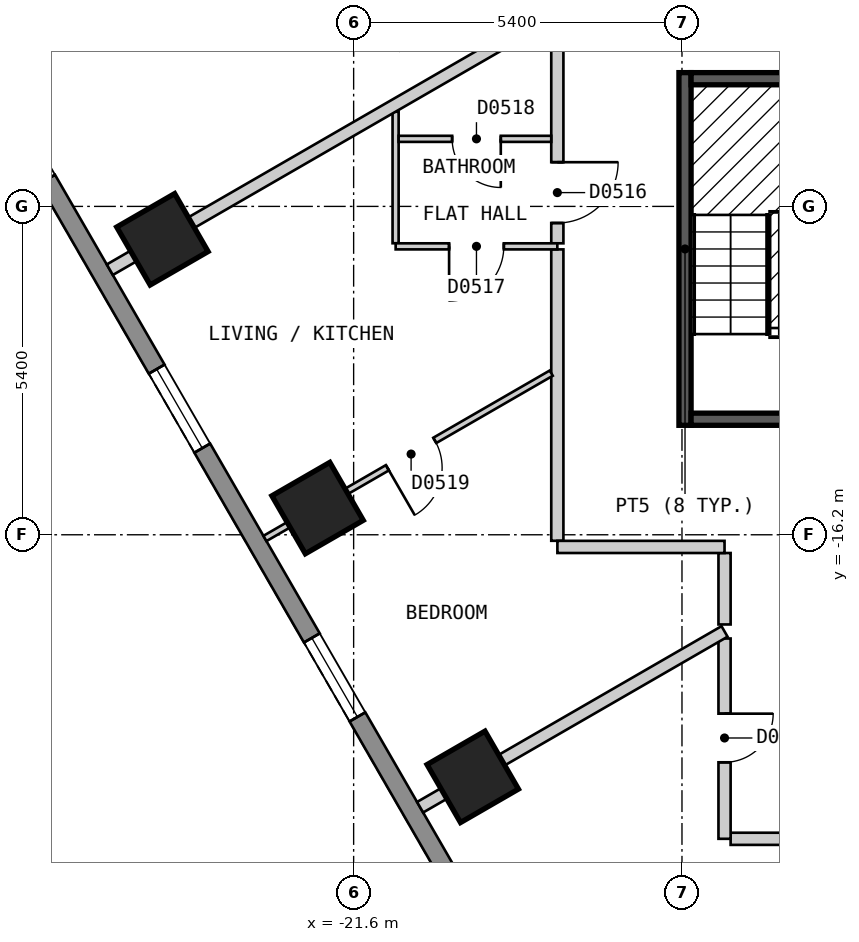
"""IFC4 building model, lengths in metres.
Left out: names, types, materials, properties, quantities, classifications, styles, units other than length and angle.
Written with IfcOpenShell. Run it as: python <this file> out.ifc"""

import sys

from ifc_helpers import new_model, si_unit, direction, frame, frame_2d, origin, origin_2d, place, context, subcontext, project, spatial, polyline, rectangle, outline, extrude, element, fill, save


model = new_model("IFC4")
c1 = context("Model", 3, precision=1e-05, world=origin(), true_north=direction((0.0, 1.0)))
c2 = subcontext(c1, "Body", "Model", "MODEL_VIEW")
j1 = project(units=[si_unit("LENGTHUNIT", "METRE"), si_unit("PLANEANGLEUNIT", "RADIAN")], contexts=[c1])
p1 = place(None, origin())
s1 = spatial("IfcSite", under=j1, at=p1, CompositionType="ELEMENT")
p2 = place(p1, origin())
s2 = spatial("IfcBuilding", under=s1, at=p2, CompositionType="ELEMENT")
p3 = place(p2, frame((0.0, 0.0, 44.4)))
s3 = spatial("IfcBuildingStorey", under=s2, at=p3, CompositionType="ELEMENT", Elevation=44.4)
for number, where, z_axis, x_axis in (
    (1, (-24.745, -11.341, 0.0), (0.0, 0.0, 1.0), (0.5, -0.866, 0.0)),
    (2, (-22.193, -15.761, 0.0), (0.0, 0.0, 1.0), (0.5, -0.866, 0.0)),
    (3, (-19.641, -20.181, 0.0), (0.0, 0.0, 1.0), (0.5, -0.866, 0.0)),
):
    element("IfcColumn", number, at=place(p3, frame(where, z_axis=z_axis, x_axis=x_axis)), inside=s3, PredefinedType="COLUMN", context=c2, shape_type="SweptSolid", body=[
        extrude(rectangle(XDim=1.1, YDim=1.1, at=origin_2d()), origin(), (0.0, 0.0, 1.0), 3.0),
    ])
p4 = place(p3, frame((-31.22, -2.425, 0.0), z_axis=(0.0, 0.0, 1.0), x_axis=(0.500001938803, -0.866024284413, 0.0)))
e4 = element("IfcWall", 4, at=p4, inside=s3, PredefinedType="SOLIDWALL", context=c2, shape_type="SweptSolid", body=[
    extrude(outline(polyline([(0.0, -0.15), (27.02, -0.15), (26.94, 0.15), (0.08, 0.15), (0.0, -0.15)])), origin(), (0.0, 0.0, 1.0), 2.7),
])
p5 = place(p4, frame((2.553, 0.0, 0.15)))
e5 = element("IfcOpeningElement", 5, at=p5, cuts=e4, PredefinedType="OPENING", context=c2, shape_type="SweptSolid", body=[
    extrude(rectangle(XDim=1.5, YDim=2.1, at=frame_2d((0.75, 1.05))), frame((0.0, 0.16, 0.0), z_axis=(0.0, -1.0, 0.0), x_axis=(1.0, 0.0, 0.0)), (0.0, 0.0, 1.0), 0.32),
])
p6 = place(p4, frame((7.657, 0.0, 0.15)))
e6 = element("IfcOpeningElement", 6, at=p6, cuts=e4, PredefinedType="OPENING", context=c2, shape_type="SweptSolid", body=[
    extrude(rectangle(XDim=1.5, YDim=2.1, at=frame_2d((0.75, 1.05))), frame((0.0, 0.16, 0.0), z_axis=(0.0, -1.0, 0.0), x_axis=(1.0, 0.0, 0.0)), (0.0, 0.0, 1.0), 0.32),
])
p7 = place(p4, frame((12.761, 0.0, 0.15)))
e7 = element("IfcOpeningElement", 7, at=p7, cuts=e4, PredefinedType="OPENING", context=c2, shape_type="SweptSolid", body=[
    extrude(rectangle(XDim=1.5, YDim=2.1, at=frame_2d((0.75, 1.05))), frame((0.0, 0.16, 0.0), z_axis=(0.0, -1.0, 0.0), x_axis=(1.0, 0.0, 0.0)), (0.0, 0.0, 1.0), 0.32),
])
p8 = place(p4, frame((17.865, 0.0, 0.15)))
e8 = element("IfcOpeningElement", 8, at=p8, cuts=e4, PredefinedType="OPENING", context=c2, shape_type="SweptSolid", body=[
    extrude(rectangle(XDim=1.5, YDim=2.1, at=frame_2d((0.75, 1.05))), frame((0.0, 0.16, 0.0), z_axis=(0.0, -1.0, 0.0), x_axis=(1.0, 0.0, 0.0)), (0.0, 0.0, 1.0), 0.32),
])
p9 = place(p4, frame((22.969, 0.0, 0.15)))
e9 = element("IfcOpeningElement", 9, at=p9, cuts=e4, PredefinedType="OPENING", context=c2, shape_type="SweptSolid", body=[
    extrude(rectangle(XDim=1.5, YDim=2.1, at=frame_2d((0.75, 1.05))), frame((0.0, 0.16, 0.0), z_axis=(0.0, -1.0, 0.0), x_axis=(1.0, 0.0, 0.0)), (0.0, 0.0, 1.0), 0.32),
])
p10 = place(p3, frame((-15.5, -16.5, 0.0), z_axis=(0.0, 0.0, 1.0), x_axis=(0.0, -1.0, 0.0)))
e10 = element("IfcWall", 10, at=p10, inside=s3, PredefinedType="PARTITIONING", context=c2, shape_type="SweptSolid", body=[
    extrude(rectangle(XDim=1.175, YDim=0.2, at=frame_2d((0.587, 0.0))), origin(), (0.0, 0.0, 1.0), 2.7),
])
p11 = place(p3, frame((-18.25, -11.507, 0.0), z_axis=(0.0, 0.0, 1.0), x_axis=(0.0, -1.0, 0.0)))
e11 = element("IfcWall", 11, at=p11, inside=s3, PredefinedType="PARTITIONING", context=c2, shape_type="SweptSolid", body=[
    extrude(rectangle(XDim=4.792, YDim=0.2, at=frame_2d((2.396, 0.0))), origin(), (0.0, 0.0, 1.0), 2.7),
])
p12 = place(p3, frame((-18.249, -16.4, 0.0), z_axis=(0.0, 0.0, 1.0), x_axis=(1.0, 0.0, 0.0)))
e12 = element("IfcWall", 12, at=p12, inside=s3, PredefinedType="PARTITIONING", context=c2, shape_type="SweptSolid", body=[
    extrude(rectangle(XDim=2.749, YDim=0.2, at=frame_2d((1.375, 0.0))), origin(), (0.0, 0.0, 1.0), 2.7),
])
p13 = place(p3, frame((-15.4, -21.2, 0.0), z_axis=(0.0, 0.0, 1.0), x_axis=(1.0, 0.0, 0.0)))
e13 = element("IfcWall", 13, at=p13, inside=s3, PredefinedType="PARTITIONING", context=c2, shape_type="SweptSolid", body=[
    extrude(rectangle(XDim=30.799, YDim=0.2, at=frame_2d((15.399, 0.0))), origin(), (0.0, 0.0, 1.0), 2.7),
])
p14 = place(p13, frame((4.985, 0.0, 0.0)))
e14 = element("IfcOpeningElement", 14, at=p14, cuts=e13, PredefinedType="OPENING", context=c2, shape_type="SweptSolid", body=[
    extrude(rectangle(XDim=0.9, YDim=2.1, at=frame_2d((0.45, 1.05))), frame((0.0, 0.11, 0.0), z_axis=(0.0, -1.0, 0.0), x_axis=(1.0, 0.0, 0.0)), (0.0, 0.0, 1.0), 0.22),
])
p15 = place(p13, frame((20.005, 0.0, 0.0)))
e15 = element("IfcOpeningElement", 15, at=p15, cuts=e13, PredefinedType="OPENING", context=c2, shape_type="SweptSolid", body=[
    extrude(rectangle(XDim=1.0, YDim=2.1, at=frame_2d((0.5, 1.05))), frame((0.0, 0.11, 0.0), z_axis=(0.0, -1.0, 0.0), x_axis=(1.0, 0.0, 0.0)), (0.0, 0.0, 1.0), 0.22),
])
p16 = place(p13, frame((24.916, 0.0, 0.0)))
e16 = element("IfcOpeningElement", 16, at=p16, cuts=e13, PredefinedType="OPENING", context=c2, shape_type="SweptSolid", body=[
    extrude(rectangle(XDim=0.9, YDim=2.1, at=frame_2d((0.45, 1.05))), frame((0.0, 0.11, 0.0), z_axis=(0.0, -1.0, 0.0), x_axis=(1.0, 0.0, 0.0)), (0.0, 0.0, 1.0), 0.22),
])
p17 = place(p3, frame((-15.5, -21.2, 0.0), z_axis=(0.0, 0.0, 1.0), x_axis=(0.0, 1.0, 0.0)))
e17 = element("IfcWall", 17, at=p17, inside=s3, PredefinedType="PARTITIONING", context=c2, shape_type="SweptSolid", body=[
    extrude(rectangle(XDim=3.294, YDim=0.2, at=frame_2d((1.647, 0.0))), origin(), (0.0, 0.0, 1.0), 2.7),
])
p18 = place(p17, frame((1.258, 0.0, 0.0)))
e18 = element("IfcOpeningElement", 18, at=p18, cuts=e17, PredefinedType="OPENING", context=c2, shape_type="SweptSolid", body=[
    extrude(rectangle(XDim=0.8, YDim=2.1, at=frame_2d((0.4, 1.05))), frame((0.0, 0.11, 0.0), z_axis=(0.0, -1.0, 0.0), x_axis=(1.0, 0.0, 0.0)), (0.0, 0.0, 1.0), 0.22),
])
p19 = place(p3, frame((-18.25, -11.407, 0.0), z_axis=(0.0, 0.0, 1.0), x_axis=(0.0, 1.0, 0.0)))
e19 = element("IfcWall", 19, at=p19, inside=s3, PredefinedType="PARTITIONING", context=c2, shape_type="SweptSolid", body=[
    extrude(rectangle(XDim=3.665, YDim=0.2, at=frame_2d((1.833, 0.0))), origin(), (0.0, 0.0, 1.0), 2.7),
])
p20 = place(p19, frame((0.334, 0.0, 0.0)))
e20 = element("IfcOpeningElement", 20, at=p20, cuts=e19, PredefinedType="OPENING", context=c2, shape_type="SweptSolid", body=[
    extrude(rectangle(XDim=1.0, YDim=2.1, at=frame_2d((0.5, 1.05))), frame((0.0, 0.11, 0.0), z_axis=(0.0, -1.0, 0.0), x_axis=(1.0, 0.0, 0.0)), (0.0, 0.0, 1.0), 0.22),
])
p21 = place(p3, frame((-20.91, -9.243, 0.0), z_axis=(0.0, 0.0, 1.0), x_axis=(0.0, -1.0, 0.0)))
e21 = element("IfcWall", 21, at=p21, inside=s3, PredefinedType="PARTITIONING", context=c2, shape_type="SweptSolid", body=[
    extrude(rectangle(XDim=2.163, YDim=0.1, at=frame_2d((1.082, 0.0))), origin(), (0.0, 0.0, 1.0), 2.7),
])
p22 = place(p3, frame((-20.86, -9.689, 0.0), z_axis=(0.0, 0.0, 1.0), x_axis=(1.0, 0.0, 0.0)))
e22 = element("IfcWall", 22, at=p22, inside=s3, PredefinedType="PARTITIONING", context=c2, shape_type="SweptSolid", body=[
    extrude(rectangle(XDim=2.51, YDim=0.1, at=frame_2d((1.255, 0.0))), origin(), (0.0, 0.0, 1.0), 2.7),
])
p23 = place(p22, frame((0.88, 0.0, 0.0)))
e23 = element("IfcOpeningElement", 23, at=p23, cuts=e22, PredefinedType="OPENING", context=c2, shape_type="SweptSolid", body=[
    extrude(rectangle(XDim=0.8, YDim=2.1, at=frame_2d((0.4, 1.05))), frame((0.0, 0.06, 0.0), z_axis=(0.0, -1.0, 0.0), x_axis=(1.0, 0.0, 0.0)), (0.0, 0.0, 1.0), 0.12),
])
p24 = place(p3, frame((-20.909, -11.457, 0.0), z_axis=(0.0, 0.0, 1.0), x_axis=(1.0, 0.0, 0.0)))
e24 = element("IfcWall", 24, at=p24, inside=s3, PredefinedType="PARTITIONING", context=c2, shape_type="SweptSolid", body=[
    extrude(rectangle(XDim=2.659, YDim=0.1, at=frame_2d((1.33, 0.0))), origin(), (0.0, 0.0, 1.0), 2.7),
])
p25 = place(p24, frame((0.879, 0.0, 0.0)))
e25 = element("IfcOpeningElement", 25, at=p25, cuts=e24, PredefinedType="OPENING", context=c2, shape_type="SweptSolid", body=[
    extrude(rectangle(XDim=0.9, YDim=2.1, at=frame_2d((0.45, 1.05))), frame((0.0, 0.06, 0.0), z_axis=(0.0, -1.0, 0.0), x_axis=(1.0, 0.0, 0.0)), (0.0, 0.0, 1.0), 0.12),
])
p26 = place(p3, frame((-23.059, -16.261, 0.0), z_axis=(0.0, 0.0, 1.0), x_axis=(0.866004639177, 0.500035963631, 0.0)))
e26 = element("IfcWall", 26, at=p26, inside=s3, PredefinedType="PARTITIONING", context=c2, shape_type="SweptSolid", body=[
    extrude(rectangle(XDim=5.438, YDim=0.1, at=frame_2d((2.719, 0.0))), origin(), (0.0, 0.0, 1.0), 2.7),
])
p27 = place(p26, frame((2.326, 0.0, 0.0)))
e27 = element("IfcOpeningElement", 27, at=p27, cuts=e26, PredefinedType="OPENING", context=c2, shape_type="SweptSolid", body=[
    extrude(rectangle(XDim=0.9, YDim=2.1, at=frame_2d((0.45, 1.05))), frame((0.0, 0.06, 0.0), z_axis=(0.0, -1.0, 0.0), x_axis=(1.0, 0.0, 0.0)), (0.0, 0.0, 1.0), 0.12),
])
p28 = place(p3, frame((-20.507, -20.681, 0.0), z_axis=(0.0, 0.0, 1.0), x_axis=(0.86602314875, 0.500003905814, 0.0)))
e28 = element("IfcWall", 28, at=p28, inside=s3, PredefinedType="PARTITIONING", context=c2, shape_type="SweptSolid", body=[
    extrude(rectangle(XDim=5.782, YDim=0.2, at=frame_2d((2.891, 0.0))), origin(), (0.0, 0.0, 1.0), 2.7),
])
p29 = place(p3, frame((-25.61, -11.841, 0.0), z_axis=(0.0, 0.0, 1.0), x_axis=(0.866004715254, 0.500035831874, 0.0)))
e29 = element("IfcWall", 29, at=p29, inside=s3, PredefinedType="PARTITIONING", context=c2, shape_type="SweptSolid", body=[
    extrude(rectangle(XDim=8.43, YDim=0.2, at=frame_2d((4.215, 0.0))), origin(), (0.0, 0.0, 1.0), 2.7),
])
p30 = place(p3, frame((-16.15, -14.4, 0.0), z_axis=(0.0, 0.0, 1.0), x_axis=(0.0, 1.0, 0.0)))
e30 = element("IfcWall", 30, at=p30, inside=s3, PredefinedType="SOLIDWALL", context=c2, shape_type="SweptSolid", body=[
    extrude(rectangle(XDim=5.8, YDim=0.2, at=frame_2d((2.9, 0.0))), origin(), (0.0, 0.0, 1.0), 2.7),
])
for number, where, z_axis, x_axis in (
    (31, (-16.05, -14.3, 0.0), (0.0, 0.0, 1.0), (1.0, 0.0, 0.0)),
    (32, (-16.05, -8.7, 0.0), (0.0, 0.0, 1.0), (1.0, 0.0, 0.0)),
):
    element("IfcWall", number, at=place(p3, frame(where, z_axis=z_axis, x_axis=x_axis)), inside=s3, PredefinedType="SOLIDWALL", context=c2, shape_type="SweptSolid", body=[
        extrude(rectangle(XDim=2.75, YDim=0.2, at=frame_2d((1.375, 0.0))), origin(), (0.0, 0.0, 1.0), 2.7),
    ])
p31 = place(p7, origin())
e33 = element("IfcWindow", 33, at=p31, inside=s3, PartitioningType="SINGLE_PANEL", PredefinedType="WINDOW", context=c2, shape_type="SweptSolid", body=[
    extrude(rectangle(XDim=1.5, YDim=2.1, at=frame_2d((0.75, 1.05))), frame((0.0, 0.03, 0.0), z_axis=(0.0, -1.0, 0.0), x_axis=(1.0, 0.0, 0.0)), (0.0, 0.0, 1.0), 0.06),
])
fill(e7, e33)
p32 = place(p8, origin())
e34 = element("IfcWindow", 34, at=p32, inside=s3, PartitioningType="SINGLE_PANEL", PredefinedType="WINDOW", context=c2, shape_type="SweptSolid", body=[
    extrude(rectangle(XDim=1.5, YDim=2.1, at=frame_2d((0.75, 1.05))), frame((0.0, 0.03, 0.0), z_axis=(0.0, -1.0, 0.0), x_axis=(1.0, 0.0, 0.0)), (0.0, 0.0, 1.0), 0.06),
])
fill(e8, e34)
p33 = place(p20, origin())
e35 = element("IfcDoor", 35, at=p33, inside=s3, OperationType="SINGLE_SWING_RIGHT", PredefinedType="DOOR", context=c2, shape_type="SweptSolid", body=[
    extrude(rectangle(XDim=1.0, YDim=2.1, at=frame_2d((0.5, 1.05))), frame((0.0, 0.025, 0.0), z_axis=(0.0, -1.0, 0.0), x_axis=(1.0, 0.0, 0.0)), (0.0, 0.0, 1.0), 0.05),
])
fill(e20, e35)
p34 = place(p25, origin())
e36 = element("IfcDoor", 36, at=p34, inside=s3, OperationType="SINGLE_SWING_LEFT", PredefinedType="DOOR", context=c2, shape_type="SweptSolid", body=[
    extrude(rectangle(XDim=0.9, YDim=2.1, at=frame_2d((0.45, 1.05))), frame((0.0, 0.025, 0.0), z_axis=(0.0, -1.0, 0.0), x_axis=(1.0, 0.0, 0.0)), (0.0, 0.0, 1.0), 0.05),
])
fill(e25, e36)
p35 = place(p23, origin())
e37 = element("IfcDoor", 37, at=p35, inside=s3, OperationType="SINGLE_SWING_RIGHT", PredefinedType="DOOR", context=c2, shape_type="SweptSolid", body=[
    extrude(rectangle(XDim=0.8, YDim=2.1, at=frame_2d((0.4, 1.05))), frame((0.0, 0.025, 0.0), z_axis=(0.0, -1.0, 0.0), x_axis=(1.0, 0.0, 0.0)), (0.0, 0.0, 1.0), 0.05),
])
fill(e23, e37)
p36 = place(p27, origin())
e38 = element("IfcDoor", 38, at=p36, inside=s3, OperationType="SINGLE_SWING_LEFT", PredefinedType="DOOR", context=c2, shape_type="SweptSolid", body=[
    extrude(rectangle(XDim=0.9, YDim=2.1, at=frame_2d((0.45, 1.05))), frame((0.0, 0.025, 0.0), z_axis=(0.0, -1.0, 0.0), x_axis=(1.0, 0.0, 0.0)), (0.0, 0.0, 1.0), 0.05),
])
fill(e27, e38)
p37 = place(p18, origin())
e39 = element("IfcDoor", 39, at=p37, inside=s3, OperationType="SINGLE_SWING_RIGHT", PredefinedType="DOOR", context=c2, shape_type="SweptSolid", body=[
    extrude(rectangle(XDim=0.8, YDim=2.1, at=frame_2d((0.4, 1.05))), frame((0.0, 0.025, 0.0), z_axis=(0.0, -1.0, 0.0), x_axis=(1.0, 0.0, 0.0)), (0.0, 0.0, 1.0), 0.05),
])
fill(e18, e39)
save(model, sys.argv[1])
